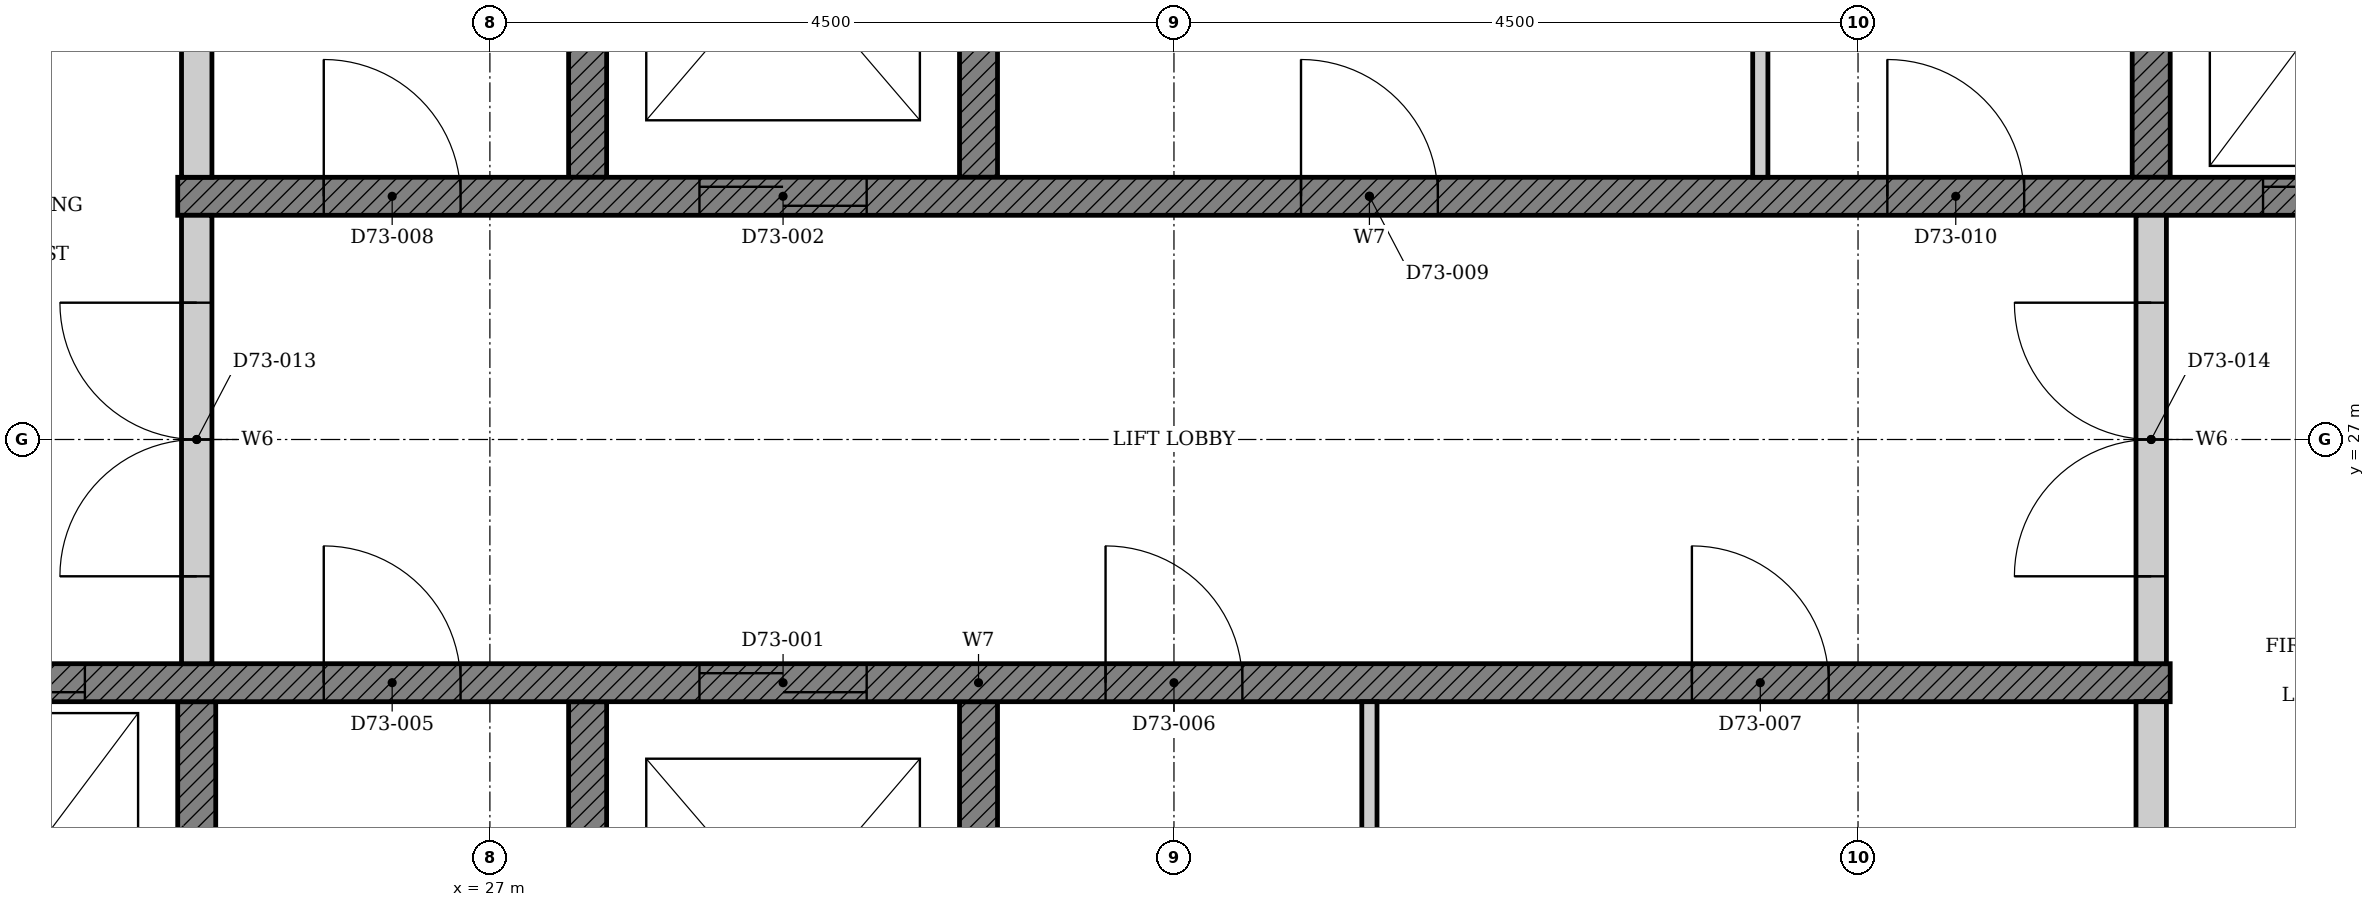
"""IFC4 building model, lengths in metres.
Left out: names, types, materials, properties, quantities, classifications, styles, units other than length and angle.
Written with IfcOpenShell. Run it as: python <this file> out.ifc"""

import sys

from ifc_helpers import new_model, si_unit, direction, frame, frame_2d, origin, place, context, subcontext, project, spatial, polyline, rectangle, outline, extrude, element, fill, save


model = new_model("IFC4")
c1 = context("Model", 3, precision=1e-05, world=origin(), true_north=direction((0.0, 1.0)))
c2 = subcontext(c1, "Body", "Model", "MODEL_VIEW")
j1 = project(units=[si_unit("LENGTHUNIT", "METRE"), si_unit("PLANEANGLEUNIT", "RADIAN")], contexts=[c1])
p1 = place(None, origin())
s1 = spatial("IfcSite", under=j1, at=p1, CompositionType="ELEMENT")
p2 = place(p1, origin())
s2 = spatial("IfcBuilding", under=s1, at=p2, CompositionType="ELEMENT")
p3 = place(p2, frame((0.0, 0.0, 287.1)))
s3 = spatial("IfcBuildingStorey", under=s2, at=p3, CompositionType="ELEMENT", Elevation=287.1)
p4 = place(p3, origin())
e1 = element("IfcWall", 1, at=p4, inside=s3, PredefinedType="SHEAR", context=c2, shape_type="SweptSolid", body=[
    extrude(outline(polyline([(22.375, 22.35), (25.197, 22.35), (25.197, 25.275), (24.947, 25.275), (24.947, 22.65), (22.625, 22.65), (22.625, 25.275), (22.375, 25.275), (22.375, 22.35)])), origin(), (0.0, 0.0, 1.0), 3.4),
])
p5 = place(p3, origin())
e2 = element("IfcWall", 2, at=p5, inside=s3, PredefinedType="SHEAR", context=c2, shape_type="SweptSolid", body=[
    extrude(outline(polyline([(27.518, 22.35), (30.339, 22.35), (30.339, 25.275), (30.089, 25.275), (30.089, 22.65), (27.768, 22.65), (27.768, 25.275), (27.518, 25.275), (27.518, 22.35)])), origin(), (0.0, 0.0, 1.0), 3.4),
])
p6 = place(p3, origin())
e3 = element("IfcWall", 3, at=p6, inside=s3, PredefinedType="SHEAR", context=c2, shape_type="SweptSolid", body=[
    extrude(outline(polyline([(27.518, 28.725), (27.768, 28.725), (27.768, 31.35), (30.089, 31.35), (30.089, 28.725), (30.339, 28.725), (30.339, 31.65), (27.518, 31.65), (27.518, 28.725)])), origin(), (0.0, 0.0, 1.0), 3.4),
])
p7 = place(p3, origin())
e4 = element("IfcWall", 4, at=p7, inside=s3, PredefinedType="SHEAR", context=c2, shape_type="SweptSolid", body=[
    extrude(outline(polyline([(37.803, 28.725), (38.053, 28.725), (38.053, 31.35), (40.375, 31.35), (40.375, 28.725), (40.625, 28.725), (40.625, 31.65), (37.803, 31.65), (37.803, 28.725)])), origin(), (0.0, 0.0, 1.0), 3.4),
])
p8 = place(p3, frame((22.375, 25.4, 0.0), z_axis=(0.0, 0.0, 1.0), x_axis=(1.0, 0.0, 0.0)))
e5 = element("IfcWall", 5, at=p8, inside=s3, PredefinedType="SHEAR", context=c2, shape_type="SweptSolid", body=[
    extrude(rectangle(XDim=15.678, YDim=0.25, at=frame_2d((7.839, 0.0))), origin(), (0.0, 0.0, 1.0), 3.4),
])
p9 = place(p8, frame((6.004, 0.0, 0.0)))
e6 = element("IfcOpeningElement", 6, at=p9, cuts=e5, PredefinedType="OPENING", context=c2, shape_type="SweptSolid", body=[
    extrude(rectangle(XDim=1.1, YDim=2.1, at=frame_2d((0.55, 1.05))), frame((0.0, 0.135, 0.0), z_axis=(0.0, -1.0, 0.0), x_axis=(1.0, 0.0, 0.0)), (0.0, 0.0, 1.0), 0.27),
])
p10 = place(p8, frame((0.861, 0.0, 0.0)))
e7 = element("IfcOpeningElement", 7, at=p10, cuts=e5, PredefinedType="OPENING", context=c2, shape_type="SweptSolid", body=[
    extrude(rectangle(XDim=1.1, YDim=2.1, at=frame_2d((0.55, 1.05))), frame((0.0, 0.135, 0.0), z_axis=(0.0, -1.0, 0.0), x_axis=(1.0, 0.0, 0.0)), (0.0, 0.0, 1.0), 0.27),
])
p11 = place(p8, frame((3.532, 0.0, 0.0)))
e8 = element("IfcOpeningElement", 8, at=p11, cuts=e5, PredefinedType="OPENING", context=c2, shape_type="SweptSolid", body=[
    extrude(rectangle(XDim=0.9, YDim=2.1, at=frame_2d((0.45, 1.05))), frame((0.0, 0.135, 0.0), z_axis=(0.0, -1.0, 0.0), x_axis=(1.0, 0.0, 0.0)), (0.0, 0.0, 1.0), 0.27),
])
p12 = place(p8, frame((8.675, 0.0, 0.0)))
e9 = element("IfcOpeningElement", 9, at=p12, cuts=e5, PredefinedType="OPENING", context=c2, shape_type="SweptSolid", body=[
    extrude(rectangle(XDim=0.9, YDim=2.1, at=frame_2d((0.45, 1.05))), frame((0.0, 0.135, 0.0), z_axis=(0.0, -1.0, 0.0), x_axis=(1.0, 0.0, 0.0)), (0.0, 0.0, 1.0), 0.27),
])
p13 = place(p8, frame((12.532, 0.0, 0.0)))
e10 = element("IfcOpeningElement", 10, at=p13, cuts=e5, PredefinedType="OPENING", context=c2, shape_type="SweptSolid", body=[
    extrude(rectangle(XDim=0.9, YDim=2.1, at=frame_2d((0.45, 1.05))), frame((0.0, 0.135, 0.0), z_axis=(0.0, -1.0, 0.0), x_axis=(1.0, 0.0, 0.0)), (0.0, 0.0, 1.0), 0.27),
])
p14 = place(p3, frame((24.947, 28.6, 0.0), z_axis=(0.0, 0.0, 1.0), x_axis=(1.0, 0.0, 0.0)))
e11 = element("IfcWall", 11, at=p14, inside=s3, PredefinedType="SHEAR", context=c2, shape_type="SweptSolid", body=[
    extrude(rectangle(XDim=15.678, YDim=0.25, at=frame_2d((7.839, 0.0))), origin(), (0.0, 0.0, 1.0), 3.4),
])
p15 = place(p14, frame((3.432, 0.0, 0.0)))
e12 = element("IfcOpeningElement", 12, at=p15, cuts=e11, PredefinedType="OPENING", context=c2, shape_type="SweptSolid", body=[
    extrude(rectangle(XDim=1.1, YDim=2.1, at=frame_2d((0.55, 1.05))), frame((0.0, 0.135, 0.0), z_axis=(0.0, -1.0, 0.0), x_axis=(1.0, 0.0, 0.0)), (0.0, 0.0, 1.0), 0.27),
])
p16 = place(p14, frame((13.718, 0.0, 0.0)))
e13 = element("IfcOpeningElement", 13, at=p16, cuts=e11, PredefinedType="OPENING", context=c2, shape_type="SweptSolid", body=[
    extrude(rectangle(XDim=1.1, YDim=2.1, at=frame_2d((0.55, 1.05))), frame((0.0, 0.135, 0.0), z_axis=(0.0, -1.0, 0.0), x_axis=(1.0, 0.0, 0.0)), (0.0, 0.0, 1.0), 0.27),
])
p17 = place(p14, frame((0.961, 0.0, 0.0)))
e14 = element("IfcOpeningElement", 14, at=p17, cuts=e11, PredefinedType="OPENING", context=c2, shape_type="SweptSolid", body=[
    extrude(rectangle(XDim=0.9, YDim=2.1, at=frame_2d((0.45, 1.05))), frame((0.0, 0.135, 0.0), z_axis=(0.0, -1.0, 0.0), x_axis=(1.0, 0.0, 0.0)), (0.0, 0.0, 1.0), 0.27),
])
p18 = place(p14, frame((7.389, 0.0, 0.0)))
e15 = element("IfcOpeningElement", 15, at=p18, cuts=e11, PredefinedType="OPENING", context=c2, shape_type="SweptSolid", body=[
    extrude(rectangle(XDim=0.9, YDim=2.1, at=frame_2d((0.45, 1.05))), frame((0.0, 0.135, 0.0), z_axis=(0.0, -1.0, 0.0), x_axis=(1.0, 0.0, 0.0)), (0.0, 0.0, 1.0), 0.27),
])
p19 = place(p14, frame((11.246, 0.0, 0.0)))
e16 = element("IfcOpeningElement", 16, at=p19, cuts=e11, PredefinedType="OPENING", context=c2, shape_type="SweptSolid", body=[
    extrude(rectangle(XDim=0.9, YDim=2.1, at=frame_2d((0.45, 1.05))), frame((0.0, 0.135, 0.0), z_axis=(0.0, -1.0, 0.0), x_axis=(1.0, 0.0, 0.0)), (0.0, 0.0, 1.0), 0.27),
])
p20 = place(p3, frame((37.928, 22.65, 0.0), z_axis=(0.0, 0.0, 1.0), x_axis=(0.0, 1.0, 0.0)))
e17 = element("IfcWall", 17, at=p20, inside=s3, PredefinedType="PARTITIONING", context=c2, shape_type="SweptSolid", body=[
    extrude(rectangle(XDim=2.625, YDim=0.2, at=frame_2d((1.312, 0.0))), origin(), (0.0, 0.0, 1.0), 3.4),
])
p21 = place(p3, frame((32.786, 22.65, 0.0), z_axis=(0.0, 0.0, 1.0), x_axis=(0.0, 1.0, 0.0)))
e18 = element("IfcWall", 18, at=p21, inside=s3, PredefinedType="PARTITIONING", context=c2, shape_type="SweptSolid", body=[
    extrude(rectangle(XDim=2.625, YDim=0.1, at=frame_2d((1.312, 0.0))), origin(), (0.0, 0.0, 1.0), 3.4),
])
p22 = place(p3, frame((25.072, 28.725, 0.0), z_axis=(0.0, 0.0, 1.0), x_axis=(0.0, 1.0, 0.0)))
e19 = element("IfcWall", 19, at=p22, inside=s3, PredefinedType="PARTITIONING", context=c2, shape_type="SweptSolid", body=[
    extrude(rectangle(XDim=2.625, YDim=0.2, at=frame_2d((1.312, 0.0))), origin(), (0.0, 0.0, 1.0), 3.4),
])
p23 = place(p3, frame((35.357, 28.725, 0.0), z_axis=(0.0, 0.0, 1.0), x_axis=(0.0, 1.0, 0.0)))
e20 = element("IfcWall", 20, at=p23, inside=s3, PredefinedType="PARTITIONING", context=c2, shape_type="SweptSolid", body=[
    extrude(rectangle(XDim=2.625, YDim=0.1, at=frame_2d((1.312, 0.0))), origin(), (0.0, 0.0, 1.0), 3.4),
])
p24 = place(p3, frame((25.072, 25.525, 0.0), z_axis=(0.0, 0.0, 1.0), x_axis=(0.0, 1.0, 0.0)))
e21 = element("IfcWall", 21, at=p24, inside=s3, PredefinedType="PARTITIONING", context=c2, shape_type="SweptSolid", body=[
    extrude(rectangle(XDim=2.95, YDim=0.2, at=frame_2d((1.475, 0.0))), origin(), (0.0, 0.0, 1.0), 3.4),
])
p25 = place(p24, frame((0.575, 0.0, 0.0)))
e22 = element("IfcOpeningElement", 22, at=p25, cuts=e21, PredefinedType="OPENING", context=c2, shape_type="SweptSolid", body=[
    extrude(rectangle(XDim=1.8, YDim=2.1, at=frame_2d((0.9, 1.05))), frame((0.0, 0.11, 0.0), z_axis=(0.0, -1.0, 0.0), x_axis=(1.0, 0.0, 0.0)), (0.0, 0.0, 1.0), 0.22),
])
p26 = place(p3, frame((37.928, 25.525, 0.0), z_axis=(0.0, 0.0, 1.0), x_axis=(0.0, 1.0, 0.0)))
e23 = element("IfcWall", 23, at=p26, inside=s3, PredefinedType="PARTITIONING", context=c2, shape_type="SweptSolid", body=[
    extrude(rectangle(XDim=2.95, YDim=0.2, at=frame_2d((1.475, 0.0))), origin(), (0.0, 0.0, 1.0), 3.4),
])
p27 = place(p26, frame((0.575, 0.0, 0.0)))
e24 = element("IfcOpeningElement", 24, at=p27, cuts=e23, PredefinedType="OPENING", context=c2, shape_type="SweptSolid", body=[
    extrude(rectangle(XDim=1.8, YDim=2.1, at=frame_2d((0.9, 1.05))), frame((0.0, 0.11, 0.0), z_axis=(0.0, -1.0, 0.0), x_axis=(1.0, 0.0, 0.0)), (0.0, 0.0, 1.0), 0.22),
])
p28 = place(p9, origin())
e25 = element("IfcDoor", 25, at=p28, inside=s3, OperationType="DOUBLE_DOOR_SLIDING", PredefinedType="DOOR", context=c2, shape_type="SweptSolid", body=[
    extrude(rectangle(XDim=1.1, YDim=2.1, at=frame_2d((0.55, 1.05))), frame((0.0, 0.025, 0.0), z_axis=(0.0, -1.0, 0.0), x_axis=(1.0, 0.0, 0.0)), (0.0, 0.0, 1.0), 0.05),
])
fill(e6, e25)
p29 = place(p15, origin())
e26 = element("IfcDoor", 26, at=p29, inside=s3, OperationType="DOUBLE_DOOR_SLIDING", PredefinedType="DOOR", context=c2, shape_type="SweptSolid", body=[
    extrude(rectangle(XDim=1.1, YDim=2.1, at=frame_2d((0.55, 1.05))), frame((0.0, 0.025, 0.0), z_axis=(0.0, -1.0, 0.0), x_axis=(1.0, 0.0, 0.0)), (0.0, 0.0, 1.0), 0.05),
])
fill(e12, e26)
p30 = place(p10, origin())
e27 = element("IfcDoor", 27, at=p30, inside=s3, OperationType="DOUBLE_DOOR_SLIDING", PredefinedType="DOOR", context=c2, shape_type="SweptSolid", body=[
    extrude(rectangle(XDim=1.1, YDim=2.1, at=frame_2d((0.55, 1.05))), frame((0.0, 0.025, 0.0), z_axis=(0.0, -1.0, 0.0), x_axis=(1.0, 0.0, 0.0)), (0.0, 0.0, 1.0), 0.05),
])
fill(e7, e27)
p31 = place(p16, origin())
e28 = element("IfcDoor", 28, at=p31, inside=s3, OperationType="DOUBLE_DOOR_SLIDING", PredefinedType="DOOR", context=c2, shape_type="SweptSolid", body=[
    extrude(rectangle(XDim=1.1, YDim=2.1, at=frame_2d((0.55, 1.05))), frame((0.0, 0.025, 0.0), z_axis=(0.0, -1.0, 0.0), x_axis=(1.0, 0.0, 0.0)), (0.0, 0.0, 1.0), 0.05),
])
fill(e13, e28)
p32 = place(p11, origin())
e29 = element("IfcDoor", 29, at=p32, inside=s3, OperationType="SINGLE_SWING_LEFT", PredefinedType="DOOR", context=c2, shape_type="SweptSolid", body=[
    extrude(rectangle(XDim=0.9, YDim=2.1, at=frame_2d((0.45, 1.05))), frame((0.0, 0.025, 0.0), z_axis=(0.0, -1.0, 0.0), x_axis=(1.0, 0.0, 0.0)), (0.0, 0.0, 1.0), 0.05),
])
fill(e8, e29)
p33 = place(p12, origin())
e30 = element("IfcDoor", 30, at=p33, inside=s3, OperationType="SINGLE_SWING_LEFT", PredefinedType="DOOR", context=c2, shape_type="SweptSolid", body=[
    extrude(rectangle(XDim=0.9, YDim=2.1, at=frame_2d((0.45, 1.05))), frame((0.0, 0.025, 0.0), z_axis=(0.0, -1.0, 0.0), x_axis=(1.0, 0.0, 0.0)), (0.0, 0.0, 1.0), 0.05),
])
fill(e9, e30)
p34 = place(p13, origin())
e31 = element("IfcDoor", 31, at=p34, inside=s3, OperationType="SINGLE_SWING_LEFT", PredefinedType="DOOR", context=c2, shape_type="SweptSolid", body=[
    extrude(rectangle(XDim=0.9, YDim=2.1, at=frame_2d((0.45, 1.05))), frame((0.0, 0.025, 0.0), z_axis=(0.0, -1.0, 0.0), x_axis=(1.0, 0.0, 0.0)), (0.0, 0.0, 1.0), 0.05),
])
fill(e10, e31)
p35 = place(p17, origin())
e32 = element("IfcDoor", 32, at=p35, inside=s3, OperationType="SINGLE_SWING_LEFT", PredefinedType="DOOR", context=c2, shape_type="SweptSolid", body=[
    extrude(rectangle(XDim=0.9, YDim=2.1, at=frame_2d((0.45, 1.05))), frame((0.0, 0.025, 0.0), z_axis=(0.0, -1.0, 0.0), x_axis=(1.0, 0.0, 0.0)), (0.0, 0.0, 1.0), 0.05),
])
fill(e14, e32)
p36 = place(p18, origin())
e33 = element("IfcDoor", 33, at=p36, inside=s3, OperationType="SINGLE_SWING_LEFT", PredefinedType="DOOR", context=c2, shape_type="SweptSolid", body=[
    extrude(rectangle(XDim=0.9, YDim=2.1, at=frame_2d((0.45, 1.05))), frame((0.0, 0.025, 0.0), z_axis=(0.0, -1.0, 0.0), x_axis=(1.0, 0.0, 0.0)), (0.0, 0.0, 1.0), 0.05),
])
fill(e15, e33)
p37 = place(p19, origin())
e34 = element("IfcDoor", 34, at=p37, inside=s3, OperationType="SINGLE_SWING_LEFT", PredefinedType="DOOR", context=c2, shape_type="SweptSolid", body=[
    extrude(rectangle(XDim=0.9, YDim=2.1, at=frame_2d((0.45, 1.05))), frame((0.0, 0.025, 0.0), z_axis=(0.0, -1.0, 0.0), x_axis=(1.0, 0.0, 0.0)), (0.0, 0.0, 1.0), 0.05),
])
fill(e16, e34)
p38 = place(p25, origin())
e35 = element("IfcDoor", 35, at=p38, inside=s3, OperationType="DOUBLE_DOOR_SINGLE_SWING", PredefinedType="DOOR", context=c2, shape_type="SweptSolid", body=[
    extrude(rectangle(XDim=1.8, YDim=2.1, at=frame_2d((0.9, 1.05))), frame((0.0, 0.025, 0.0), z_axis=(0.0, -1.0, 0.0), x_axis=(1.0, 0.0, 0.0)), (0.0, 0.0, 1.0), 0.05),
])
fill(e22, e35)
p39 = place(p27, origin())
e36 = element("IfcDoor", 36, at=p39, inside=s3, OperationType="DOUBLE_DOOR_SINGLE_SWING", PredefinedType="DOOR", context=c2, shape_type="SweptSolid", body=[
    extrude(rectangle(XDim=1.8, YDim=2.1, at=frame_2d((0.9, 1.05))), frame((0.0, 0.025, 0.0), z_axis=(0.0, -1.0, 0.0), x_axis=(1.0, 0.0, 0.0)), (0.0, 0.0, 1.0), 0.05),
])
fill(e24, e36)
save(model, sys.argv[1])
